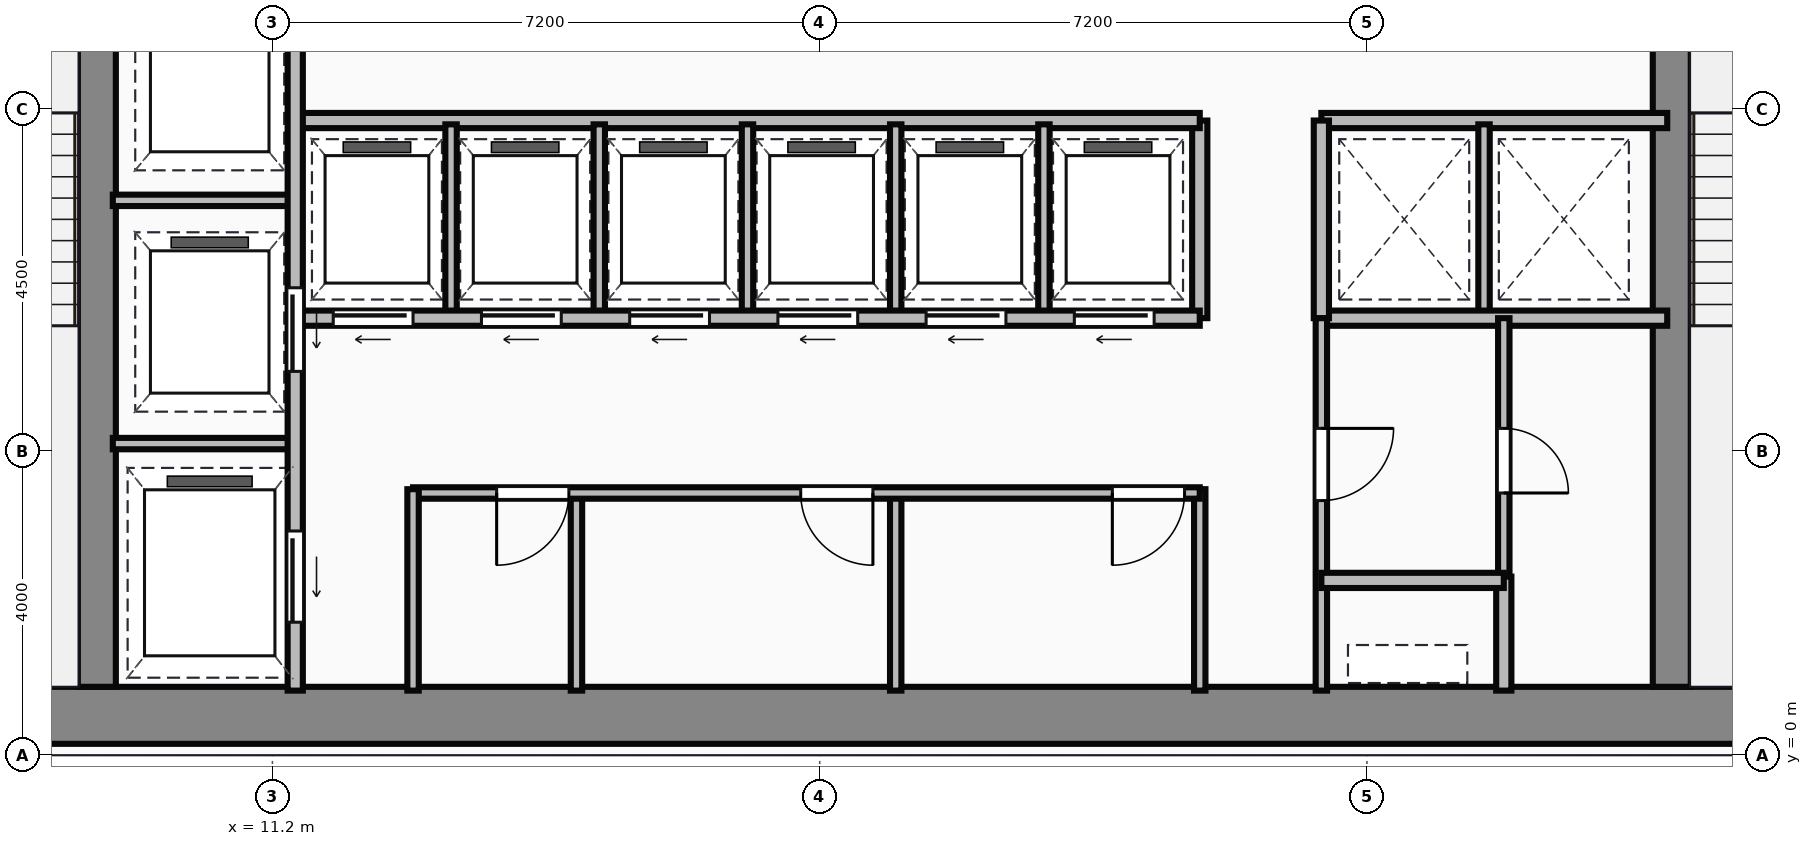
"""IFC4 building model, lengths in metres.
Left out: names, types, materials, properties, quantities, classifications, styles, units other than length and angle.
Written with IfcOpenShell. Run it as: python <this file> out.ifc"""

import sys

from ifc_helpers import new_model, si_unit, direction, frame, frame_2d, origin, place, context, subcontext, project, spatial, rectangle, extrude, source, transform, mapped, element, fill, save


model = new_model("IFC4")
c1 = context("Model", 3, precision=1e-05, world=origin(), true_north=direction((0.0, 1.0)))
c2 = subcontext(c1, "Body", "Model", "MODEL_VIEW")
j1 = project(units=[si_unit("LENGTHUNIT", "METRE"), si_unit("PLANEANGLEUNIT", "RADIAN")], contexts=[c1])
p1 = place(None, origin())
s1 = spatial("IfcSite", under=j1, at=p1, CompositionType="ELEMENT")
p2 = place(p1, origin())
s2 = spatial("IfcBuilding", under=s1, at=p2, CompositionType="ELEMENT")
p3 = place(p2, frame((0.0, 0.0, 128.8)))
s3 = spatial("IfcBuildingStorey", under=s2, at=p3, CompositionType="ELEMENT", Elevation=128.8)
m1 = source(origin(), c2, "Body", "SweptSolid", [
    extrude(rectangle(XDim=29.5, YDim=0.75, at=frame_2d((14.75, 0.0))), origin(), (0.0, 0.0, 1.0), 3.65),
])
p4 = place(p3, frame((4.5, 0.525, 0.0), z_axis=(0.0, 0.0, 1.0), x_axis=(1.0, 0.0, 0.0)))
e1 = element("IfcWall", 1, at=p4, inside=s3, PredefinedType="SHEAR", context=c2, shape_type="MappedRepresentation", body=[
    mapped(m1, transform((0.0, 0.0, 0.0))),
])
m2 = source(origin(), c2, "Body", "SweptSolid", [
    extrude(rectangle(XDim=12.35, YDim=0.5, at=frame_2d((6.175, 0.0))), origin(), (0.0, 0.0, 1.0), 3.65),
])
for number, where, z_axis, x_axis in (
    (2, (8.89, 0.9, 0.0), (0.0, 0.0, 1.0), (0.0, 1.0, 0.0)),
    (3, (29.61, 0.9, 0.0), (0.0, 0.0, 1.0), (0.0, 1.0, 0.0)),
):
    element("IfcWall", number, at=place(p3, frame(where, z_axis=z_axis, x_axis=x_axis)), inside=s3, PredefinedType="SHEAR", context=c2, shape_type="MappedRepresentation", body=[
        mapped(m2, transform((0.0, 0.0, 0.0))),
    ])
m3 = source(origin(), c2, "Body", "SweptSolid", [
    extrude(rectangle(XDim=9.6, YDim=0.2, at=frame_2d((4.8, 0.0))), origin(), (0.0, 0.0, 1.0), 3.4),
])
p5 = place(p3, frame((11.5, 0.85, 0.0), z_axis=(0.0, 0.0, 1.0), x_axis=(0.0, 1.0, 0.0)))
e4 = element("IfcWall", 4, at=p5, inside=s3, PredefinedType="PARTITIONING", context=c2, shape_type="MappedRepresentation", body=[
    mapped(m3, transform((0.0, 0.0, 0.0))),
])
p6 = place(p5, frame((4.2, 0.0, 0.0)))
e5 = element("IfcOpeningElement", 5, at=p6, cuts=e4, PredefinedType="OPENING", context=c2, shape_type="SweptSolid", body=[
    extrude(rectangle(XDim=1.1, YDim=2.15, at=frame_2d((0.55, 1.075))), frame((0.0, 0.11, 0.0), z_axis=(0.0, -1.0, 0.0), x_axis=(1.0, 0.0, 0.0)), (0.0, 0.0, 1.0), 0.22),
])
p7 = place(p5, frame((0.9, 0.0, 0.0)))
e6 = element("IfcOpeningElement", 6, at=p7, cuts=e4, PredefinedType="OPENING", context=c2, shape_type="SweptSolid", body=[
    extrude(rectangle(XDim=1.2, YDim=2.15, at=frame_2d((0.6, 1.075))), frame((0.0, 0.11, 0.0), z_axis=(0.0, -1.0, 0.0), x_axis=(1.0, 0.0, 0.0)), (0.0, 0.0, 1.0), 0.22),
])
m4 = source(origin(), c2, "Body", "SweptSolid", [
    extrude(rectangle(XDim=2.4, YDim=0.15, at=frame_2d((1.2, 0.0))), origin(), (0.0, 0.0, 1.0), 3.4),
])
for number, where, z_axis, x_axis in (
    (7, (9.1, 4.1, 0.0), (0.0, 0.0, 1.0), (1.0, 0.0, 0.0)),
    (8, (9.1, 7.3, 0.0), (0.0, 0.0, 1.0), (1.0, 0.0, 0.0)),
):
    element("IfcWall", number, at=place(p3, frame(where, z_axis=z_axis, x_axis=x_axis)), inside=s3, PredefinedType="PARTITIONING", context=c2, shape_type="MappedRepresentation", body=[
        mapped(m4, transform((0.0, 0.0, 0.0))),
    ])
m5 = source(origin(), c2, "Body", "SweptSolid", [
    extrude(rectangle(XDim=2.65, YDim=0.15, at=frame_2d((1.325, 0.0))), origin(), (0.0, 0.0, 1.0), 3.4),
])
p8 = place(p3, frame((13.05, 0.85, 0.0), z_axis=(0.0, 0.0, 1.0), x_axis=(0.0, 1.0, 0.0)))
e9 = element("IfcWall", 9, at=p8, inside=s3, PredefinedType="PARTITIONING", context=c2, shape_type="MappedRepresentation", body=[
    mapped(m5, transform((0.0, 0.0, 0.0))),
])
m6 = source(origin(), c2, "Body", "SweptSolid", [
    extrude(rectangle(XDim=10.35, YDim=0.15, at=frame_2d((5.175, 0.0))), origin(), (0.0, 0.0, 1.0), 3.4),
])
p9 = place(p3, frame((13.05, 3.45, 0.0), z_axis=(0.0, 0.0, 1.0), x_axis=(1.0, 0.0, 0.0)))
e10 = element("IfcWall", 10, at=p9, inside=s3, PredefinedType="PARTITIONING", context=c2, shape_type="MappedRepresentation", body=[
    mapped(m6, transform((0.0, 0.0, 0.0))),
])
p10 = place(p9, frame((1.1, 0.0, 0.0)))
e11 = element("IfcOpeningElement", 11, at=p10, cuts=e10, PredefinedType="OPENING", context=c2, shape_type="SweptSolid", body=[
    extrude(rectangle(XDim=0.95, YDim=2.15, at=frame_2d((0.475, 1.075))), frame((0.0, 0.085, 0.0), z_axis=(0.0, -1.0, 0.0), x_axis=(1.0, 0.0, 0.0)), (0.0, 0.0, 1.0), 0.17),
])
p11 = place(p9, frame((5.1, 0.0, 0.0)))
e12 = element("IfcOpeningElement", 12, at=p11, cuts=e10, PredefinedType="OPENING", context=c2, shape_type="SweptSolid", body=[
    extrude(rectangle(XDim=0.95, YDim=2.15, at=frame_2d((0.475, 1.075))), frame((0.0, 0.085, 0.0), z_axis=(0.0, -1.0, 0.0), x_axis=(1.0, 0.0, 0.0)), (0.0, 0.0, 1.0), 0.17),
])
p12 = place(p9, frame((9.2, 0.0, 0.0)))
e13 = element("IfcOpeningElement", 13, at=p12, cuts=e10, PredefinedType="OPENING", context=c2, shape_type="SweptSolid", body=[
    extrude(rectangle(XDim=0.95, YDim=2.15, at=frame_2d((0.475, 1.075))), frame((0.0, 0.085, 0.0), z_axis=(0.0, -1.0, 0.0), x_axis=(1.0, 0.0, 0.0)), (0.0, 0.0, 1.0), 0.17),
])
p13 = place(p3, frame((23.4, 0.85, 0.0), z_axis=(0.0, 0.0, 1.0), x_axis=(0.0, 1.0, 0.0)))
e14 = element("IfcWall", 14, at=p13, inside=s3, PredefinedType="PARTITIONING", context=c2, shape_type="MappedRepresentation", body=[
    mapped(m5, transform((0.0, 0.0, 0.0))),
])
m7 = source(origin(), c2, "Body", "SweptSolid", [
    extrude(rectangle(XDim=2.6, YDim=0.15, at=frame_2d((1.3, 0.0))), origin(), (0.0, 0.0, 1.0), 3.4),
])
for number, where, z_axis, x_axis in (
    (15, (15.2, 0.85, 0.0), (0.0, 0.0, 1.0), (0.0, 1.0, 0.0)),
    (16, (19.4, 0.85, 0.0), (0.0, 0.0, 1.0), (0.0, 1.0, 0.0)),
):
    element("IfcWall", number, at=place(p3, frame(where, z_axis=z_axis, x_axis=x_axis)), inside=s3, PredefinedType="PARTITIONING", context=c2, shape_type="MappedRepresentation", body=[
        mapped(m7, transform((0.0, 0.0, 0.0))),
    ])
m8 = source(origin(), c2, "Body", "SweptSolid", [
    extrude(rectangle(XDim=11.85, YDim=0.2, at=frame_2d((5.925, 0.0))), origin(), (0.0, 0.0, 1.0), 3.4),
])
p14 = place(p3, frame((11.55, 5.75, 0.0), z_axis=(0.0, 0.0, 1.0), x_axis=(1.0, 0.0, 0.0)))
e17 = element("IfcWall", 17, at=p14, inside=s3, PredefinedType="PARTITIONING", context=c2, shape_type="MappedRepresentation", body=[
    mapped(m8, transform((0.0, 0.0, 0.0))),
])
p15 = place(p14, frame((0.45, 0.0, 0.0)))
e18 = element("IfcOpeningElement", 18, at=p15, cuts=e17, PredefinedType="OPENING", context=c2, shape_type="SweptSolid", body=[
    extrude(rectangle(XDim=1.05, YDim=2.15, at=frame_2d((0.525, 1.075))), frame((0.0, 0.11, 0.0), z_axis=(0.0, -1.0, 0.0), x_axis=(1.0, 0.0, 0.0)), (0.0, 0.0, 1.0), 0.22),
])
p16 = place(p14, frame((2.4, 0.0, 0.0)))
e19 = element("IfcOpeningElement", 19, at=p16, cuts=e17, PredefinedType="OPENING", context=c2, shape_type="SweptSolid", body=[
    extrude(rectangle(XDim=1.05, YDim=2.15, at=frame_2d((0.525, 1.075))), frame((0.0, 0.11, 0.0), z_axis=(0.0, -1.0, 0.0), x_axis=(1.0, 0.0, 0.0)), (0.0, 0.0, 1.0), 0.22),
])
p17 = place(p14, frame((4.35, 0.0, 0.0)))
e20 = element("IfcOpeningElement", 20, at=p17, cuts=e17, PredefinedType="OPENING", context=c2, shape_type="SweptSolid", body=[
    extrude(rectangle(XDim=1.05, YDim=2.15, at=frame_2d((0.525, 1.075))), frame((0.0, 0.11, 0.0), z_axis=(0.0, -1.0, 0.0), x_axis=(1.0, 0.0, 0.0)), (0.0, 0.0, 1.0), 0.22),
])
p18 = place(p14, frame((6.3, 0.0, 0.0)))
e21 = element("IfcOpeningElement", 21, at=p18, cuts=e17, PredefinedType="OPENING", context=c2, shape_type="SweptSolid", body=[
    extrude(rectangle(XDim=1.05, YDim=2.15, at=frame_2d((0.525, 1.075))), frame((0.0, 0.11, 0.0), z_axis=(0.0, -1.0, 0.0), x_axis=(1.0, 0.0, 0.0)), (0.0, 0.0, 1.0), 0.22),
])
p19 = place(p14, frame((8.25, 0.0, 0.0)))
e22 = element("IfcOpeningElement", 22, at=p19, cuts=e17, PredefinedType="OPENING", context=c2, shape_type="SweptSolid", body=[
    extrude(rectangle(XDim=1.05, YDim=2.15, at=frame_2d((0.525, 1.075))), frame((0.0, 0.11, 0.0), z_axis=(0.0, -1.0, 0.0), x_axis=(1.0, 0.0, 0.0)), (0.0, 0.0, 1.0), 0.22),
])
p20 = place(p14, frame((10.2, 0.0, 0.0)))
e23 = element("IfcOpeningElement", 23, at=p20, cuts=e17, PredefinedType="OPENING", context=c2, shape_type="SweptSolid", body=[
    extrude(rectangle(XDim=1.05, YDim=2.15, at=frame_2d((0.525, 1.075))), frame((0.0, 0.11, 0.0), z_axis=(0.0, -1.0, 0.0), x_axis=(1.0, 0.0, 0.0)), (0.0, 0.0, 1.0), 0.22),
])
p21 = place(p3, frame((11.55, 8.35, 0.0), z_axis=(0.0, 0.0, 1.0), x_axis=(1.0, 0.0, 0.0)))
e24 = element("IfcWall", 24, at=p21, inside=s3, PredefinedType="PARTITIONING", context=c2, shape_type="MappedRepresentation", body=[
    mapped(m8, transform((0.0, 0.0, 0.0))),
])
m9 = source(origin(), c2, "Body", "SweptSolid", [
    extrude(rectangle(XDim=2.6, YDim=0.2, at=frame_2d((1.3, 0.0))), origin(), (0.0, 0.0, 1.0), 3.4),
])
p22 = place(p3, frame((23.4, 5.75, 0.0), z_axis=(0.0, 0.0, 1.0), x_axis=(0.0, 1.0, 0.0)))
e25 = element("IfcWall", 25, at=p22, inside=s3, PredefinedType="PARTITIONING", context=c2, shape_type="MappedRepresentation", body=[
    mapped(m9, transform((0.0, 0.0, 0.0))),
])
m10 = source(origin(), c2, "Body", "SweptSolid", [
    extrude(rectangle(XDim=2.5, YDim=0.15, at=frame_2d((1.25, 0.0))), origin(), (0.0, 0.0, 1.0), 3.4),
])
for number, where, z_axis, x_axis in (
    (26, (13.55, 5.8, 0.0), (0.0, 0.0, 1.0), (0.0, 1.0, 0.0)),
    (27, (15.5, 5.8, 0.0), (0.0, 0.0, 1.0), (0.0, 1.0, 0.0)),
    (28, (17.45, 5.8, 0.0), (0.0, 0.0, 1.0), (0.0, 1.0, 0.0)),
    (29, (19.4, 5.8, 0.0), (0.0, 0.0, 1.0), (0.0, 1.0, 0.0)),
    (30, (21.35, 5.8, 0.0), (0.0, 0.0, 1.0), (0.0, 1.0, 0.0)),
):
    element("IfcWall", number, at=place(p3, frame(where, z_axis=z_axis, x_axis=x_axis)), inside=s3, PredefinedType="PARTITIONING", context=c2, shape_type="MappedRepresentation", body=[
        mapped(m10, transform((0.0, 0.0, 0.0))),
    ])
m11 = source(origin(), c2, "Body", "SweptSolid", [
    extrude(rectangle(XDim=4.55, YDim=0.2, at=frame_2d((2.275, 0.0))), origin(), (0.0, 0.0, 1.0), 3.4),
])
for number, where, z_axis, x_axis in (
    (31, (25.0, 8.35, 0.0), (0.0, 0.0, 1.0), (1.0, 0.0, 0.0)),
    (32, (25.0, 5.75, 0.0), (0.0, 0.0, 1.0), (1.0, 0.0, 0.0)),
):
    element("IfcWall", number, at=place(p3, frame(where, z_axis=z_axis, x_axis=x_axis)), inside=s3, PredefinedType="PARTITIONING", context=c2, shape_type="MappedRepresentation", body=[
        mapped(m11, transform((0.0, 0.0, 0.0))),
    ])
p23 = place(p3, frame((25.0, 5.75, 0.0), z_axis=(0.0, 0.0, 1.0), x_axis=(0.0, 1.0, 0.0)))
e33 = element("IfcWall", 33, at=p23, inside=s3, PredefinedType="PARTITIONING", context=c2, shape_type="MappedRepresentation", body=[
    mapped(m9, transform((0.0, 0.0, 0.0))),
])
p24 = place(p3, frame((27.14, 5.8, 0.0), z_axis=(0.0, 0.0, 1.0), x_axis=(0.0, 1.0, 0.0)))
e34 = element("IfcWall", 34, at=p24, inside=s3, PredefinedType="PARTITIONING", context=c2, shape_type="MappedRepresentation", body=[
    mapped(m10, transform((0.0, 0.0, 0.0))),
])
m12 = source(origin(), c2, "Body", "SweptSolid", [
    extrude(rectangle(XDim=4.9, YDim=0.15, at=frame_2d((2.45, 0.0))), origin(), (0.0, 0.0, 1.0), 3.4),
])
p25 = place(p3, frame((25.0, 0.85, 0.0), z_axis=(0.0, 0.0, 1.0), x_axis=(0.0, 1.0, 0.0)))
e35 = element("IfcWall", 35, at=p25, inside=s3, PredefinedType="PARTITIONING", context=c2, shape_type="MappedRepresentation", body=[
    mapped(m12, transform((0.0, 0.0, 0.0))),
])
p26 = place(p25, frame((2.5, 0.0, 0.0)))
e36 = element("IfcOpeningElement", 36, at=p26, cuts=e35, PredefinedType="OPENING", context=c2, shape_type="SweptSolid", body=[
    extrude(rectangle(XDim=0.95, YDim=2.15, at=frame_2d((0.475, 1.075))), frame((0.0, 0.085, 0.0), z_axis=(0.0, -1.0, 0.0), x_axis=(1.0, 0.0, 0.0)), (0.0, 0.0, 1.0), 0.17),
])
m13 = source(origin(), c2, "Body", "SweptSolid", [
    extrude(rectangle(XDim=2.4, YDim=0.2, at=frame_2d((1.2, 0.0))), origin(), (0.0, 0.0, 1.0), 3.4),
])
p27 = place(p3, frame((25.0, 2.3, 0.0), z_axis=(0.0, 0.0, 1.0), x_axis=(1.0, 0.0, 0.0)))
e37 = element("IfcWall", 37, at=p27, inside=s3, PredefinedType="PARTITIONING", context=c2, shape_type="MappedRepresentation", body=[
    mapped(m13, transform((0.0, 0.0, 0.0))),
])
m14 = source(origin(), c2, "Body", "SweptSolid", [
    extrude(rectangle(XDim=1.5, YDim=0.2, at=frame_2d((0.75, 0.0))), origin(), (0.0, 0.0, 1.0), 3.4),
])
p28 = place(p3, frame((27.4, 0.85, 0.0), z_axis=(0.0, 0.0, 1.0), x_axis=(0.0, 1.0, 0.0)))
e38 = element("IfcWall", 38, at=p28, inside=s3, PredefinedType="PARTITIONING", context=c2, shape_type="MappedRepresentation", body=[
    mapped(m14, transform((0.0, 0.0, 0.0))),
])
m15 = source(origin(), c2, "Body", "SweptSolid", [
    extrude(rectangle(XDim=3.4, YDim=0.15, at=frame_2d((1.7, 0.0))), origin(), (0.0, 0.0, 1.0), 3.4),
])
p29 = place(p3, frame((27.4, 2.35, 0.0), z_axis=(0.0, 0.0, 1.0), x_axis=(0.0, 1.0, 0.0)))
e39 = element("IfcWall", 39, at=p29, inside=s3, PredefinedType="PARTITIONING", context=c2, shape_type="MappedRepresentation", body=[
    mapped(m15, transform((0.0, 0.0, 0.0))),
])
p30 = place(p29, frame((1.1, 0.0, 0.0)))
e40 = element("IfcOpeningElement", 40, at=p30, cuts=e39, PredefinedType="OPENING", context=c2, shape_type="SweptSolid", body=[
    extrude(rectangle(XDim=0.85, YDim=2.1, at=frame_2d((0.425, 1.05))), frame((0.0, 0.085, 0.0), z_axis=(0.0, -1.0, 0.0), x_axis=(1.0, 0.0, 0.0)), (0.0, 0.0, 1.0), 0.17),
])
m16 = source(origin(), c2, "Body", "SweptSolid", [
    extrude(rectangle(XDim=1.1, YDim=2.15, at=frame_2d((0.55, 1.075))), frame((0.0, 0.025, 0.0), z_axis=(0.0, -1.0, 0.0), x_axis=(1.0, 0.0, 0.0)), (0.0, 0.0, 1.0), 0.05),
])
p31 = place(p6, frame((1.1, 0.0, 0.0), z_axis=(0.0, 0.0, 1.0), x_axis=(-1.0, 0.0, 0.0)))
e41 = element("IfcDoor", 41, at=p31, inside=s3, OperationType="SLIDING_TO_LEFT", PredefinedType="DOOR", context=c2, shape_type="MappedRepresentation", body=[
    mapped(m16, transform((0.0, 0.0, 0.0))),
])
fill(e5, e41)
m17 = source(origin(), c2, "Body", "SweptSolid", [
    extrude(rectangle(XDim=1.2, YDim=2.15, at=frame_2d((0.6, 1.075))), frame((0.0, 0.025, 0.0), z_axis=(0.0, -1.0, 0.0), x_axis=(1.0, 0.0, 0.0)), (0.0, 0.0, 1.0), 0.05),
])
p32 = place(p7, frame((1.2, 0.0, 0.0), z_axis=(0.0, 0.0, 1.0), x_axis=(-1.0, 0.0, 0.0)))
e42 = element("IfcDoor", 42, at=p32, inside=s3, OperationType="SLIDING_TO_LEFT", PredefinedType="DOOR", context=c2, shape_type="MappedRepresentation", body=[
    mapped(m17, transform((0.0, 0.0, 0.0))),
])
fill(e6, e42)
m18 = source(origin(), c2, "Body", "SweptSolid", [
    extrude(rectangle(XDim=0.95, YDim=2.15, at=frame_2d((0.475, 1.075))), frame((0.0, 0.025, 0.0), z_axis=(0.0, -1.0, 0.0), x_axis=(1.0, 0.0, 0.0)), (0.0, 0.0, 1.0), 0.05),
])
p33 = place(p10, origin())
e43 = element("IfcDoor", 43, at=p33, inside=s3, OperationType="SINGLE_SWING_LEFT", PredefinedType="DOOR", context=c2, shape_type="MappedRepresentation", body=[
    mapped(m18, transform((0.0, 0.0, 0.0))),
])
fill(e11, e43)
p34 = place(p11, origin())
e44 = element("IfcDoor", 44, at=p34, inside=s3, OperationType="SINGLE_SWING_RIGHT", PredefinedType="DOOR", context=c2, shape_type="MappedRepresentation", body=[
    mapped(m18, transform((0.0, 0.0, 0.0))),
])
fill(e12, e44)
p35 = place(p12, origin())
e45 = element("IfcDoor", 45, at=p35, inside=s3, OperationType="SINGLE_SWING_LEFT", PredefinedType="DOOR", context=c2, shape_type="MappedRepresentation", body=[
    mapped(m18, transform((0.0, 0.0, 0.0))),
])
fill(e13, e45)
m19 = source(origin(), c2, "Body", "SweptSolid", [
    extrude(rectangle(XDim=1.05, YDim=2.15, at=frame_2d((0.525, 1.075))), frame((0.0, 0.025, 0.0), z_axis=(0.0, -1.0, 0.0), x_axis=(1.0, 0.0, 0.0)), (0.0, 0.0, 1.0), 0.05),
])
p36 = place(p15, frame((1.05, 0.0, 0.0), z_axis=(0.0, 0.0, 1.0), x_axis=(-1.0, 0.0, 0.0)))
e46 = element("IfcDoor", 46, at=p36, inside=s3, OperationType="SLIDING_TO_LEFT", PredefinedType="DOOR", context=c2, shape_type="MappedRepresentation", body=[
    mapped(m19, transform((0.0, 0.0, 0.0))),
])
fill(e18, e46)
p37 = place(p16, frame((1.05, 0.0, 0.0), z_axis=(0.0, 0.0, 1.0), x_axis=(-1.0, 0.0, 0.0)))
e47 = element("IfcDoor", 47, at=p37, inside=s3, OperationType="SLIDING_TO_LEFT", PredefinedType="DOOR", context=c2, shape_type="MappedRepresentation", body=[
    mapped(m19, transform((0.0, 0.0, 0.0))),
])
fill(e19, e47)
p38 = place(p17, frame((1.05, 0.0, 0.0), z_axis=(0.0, 0.0, 1.0), x_axis=(-1.0, 0.0, 0.0)))
e48 = element("IfcDoor", 48, at=p38, inside=s3, OperationType="SLIDING_TO_LEFT", PredefinedType="DOOR", context=c2, shape_type="MappedRepresentation", body=[
    mapped(m19, transform((0.0, 0.0, 0.0))),
])
fill(e20, e48)
p39 = place(p18, frame((1.05, 0.0, 0.0), z_axis=(0.0, 0.0, 1.0), x_axis=(-1.0, 0.0, 0.0)))
e49 = element("IfcDoor", 49, at=p39, inside=s3, OperationType="SLIDING_TO_LEFT", PredefinedType="DOOR", context=c2, shape_type="MappedRepresentation", body=[
    mapped(m19, transform((0.0, 0.0, 0.0))),
])
fill(e21, e49)
p40 = place(p19, frame((1.05, 0.0, 0.0), z_axis=(0.0, 0.0, 1.0), x_axis=(-1.0, 0.0, 0.0)))
e50 = element("IfcDoor", 50, at=p40, inside=s3, OperationType="SLIDING_TO_LEFT", PredefinedType="DOOR", context=c2, shape_type="MappedRepresentation", body=[
    mapped(m19, transform((0.0, 0.0, 0.0))),
])
fill(e22, e50)
p41 = place(p20, frame((1.05, 0.0, 0.0), z_axis=(0.0, 0.0, 1.0), x_axis=(-1.0, 0.0, 0.0)))
e51 = element("IfcDoor", 51, at=p41, inside=s3, OperationType="SLIDING_TO_LEFT", PredefinedType="DOOR", context=c2, shape_type="MappedRepresentation", body=[
    mapped(m19, transform((0.0, 0.0, 0.0))),
])
fill(e23, e51)
p42 = place(p26, origin())
e52 = element("IfcDoor", 52, at=p42, inside=s3, OperationType="SINGLE_SWING_RIGHT", PredefinedType="DOOR", context=c2, shape_type="MappedRepresentation", body=[
    mapped(m18, transform((0.0, 0.0, 0.0))),
])
fill(e36, e52)
m20 = source(origin(), c2, "Body", "SweptSolid", [
    extrude(rectangle(XDim=0.85, YDim=2.1, at=frame_2d((0.425, 1.05))), frame((0.0, 0.025, 0.0), z_axis=(0.0, -1.0, 0.0), x_axis=(1.0, 0.0, 0.0)), (0.0, 0.0, 1.0), 0.05),
])
p43 = place(p30, frame((0.85, 0.0, 0.0), z_axis=(0.0, 0.0, 1.0), x_axis=(-1.0, 0.0, 0.0)))
e53 = element("IfcDoor", 53, at=p43, inside=s3, OperationType="SINGLE_SWING_LEFT", PredefinedType="DOOR", context=c2, shape_type="MappedRepresentation", body=[
    mapped(m20, transform((0.0, 0.0, 0.0))),
])
fill(e40, e53)
save(model, sys.argv[1])
